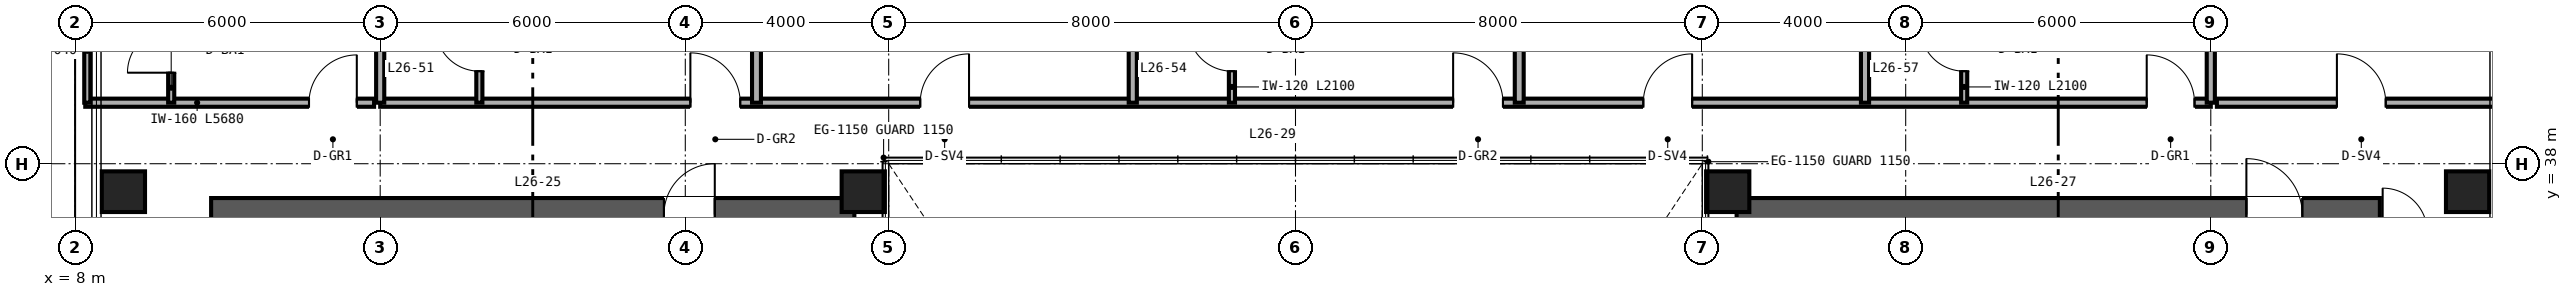
"""IFC4 building model, lengths in metres.
Left out: names, types, materials, properties, quantities, classifications, styles, units other than length and angle.
Written with IfcOpenShell. Run it as: python <this file> out.ifc"""

import sys

from ifc_helpers import new_model, si_unit, direction, frame, frame_2d, origin, origin_2d, place, context, subcontext, project, spatial, rectangle, hollow_rectangle, extrude, source, transform, mapped, element, fill, save


model = new_model("IFC4")
c1 = context("Model", 3, precision=1e-05, world=origin(), true_north=direction((0.0, 1.0)))
c2 = subcontext(c1, "Body", "Model", "MODEL_VIEW")
j1 = project(units=[si_unit("LENGTHUNIT", "METRE"), si_unit("PLANEANGLEUNIT", "RADIAN")], contexts=[c1])
p1 = place(None, origin())
s1 = spatial("IfcSite", under=j1, at=p1, CompositionType="ELEMENT")
p2 = place(p1, origin())
s2 = spatial("IfcBuilding", under=s1, at=p2, CompositionType="ELEMENT")
p3 = place(p2, frame((0.0, 0.0, 108.0)))
s3 = spatial("IfcBuildingStorey", under=s2, at=p3, CompositionType="ELEMENT", Elevation=108.0)
p4 = place(p3, frame((10.675, 37.0, 0.0), z_axis=(0.0, 0.0, 1.0), x_axis=(1.0, 0.0, 0.0)))
e1 = element("IfcWall", 1, at=p4, inside=s3, PredefinedType="SHEAR", context=c2, shape_type="SweptSolid", body=[
    extrude(rectangle(XDim=12.65, YDim=0.65, at=frame_2d((6.325, 0.0))), origin(), (0.0, 0.0, 1.0), 3.36),
])
p5 = place(p4, frame((8.905, 0.0, 0.0)))
e2 = element("IfcOpeningElement", 2, at=p5, cuts=e1, PredefinedType="OPENING", context=c2, shape_type="SweptSolid", body=[
    extrude(rectangle(XDim=1.0, YDim=2.15, at=frame_2d((0.5, 1.075))), frame((0.0, 0.335, 0.0), z_axis=(0.0, -1.0, 0.0), x_axis=(1.0, 0.0, 0.0)), (0.0, 0.0, 1.0), 0.67),
])
p6 = place(p3, frame((40.675, 37.0, 0.0), z_axis=(0.0, 0.0, 1.0), x_axis=(1.0, 0.0, 0.0)))
e3 = element("IfcWall", 3, at=p6, inside=s3, PredefinedType="SHEAR", context=c2, shape_type="SweptSolid", body=[
    extrude(rectangle(XDim=12.65, YDim=0.65, at=frame_2d((6.325, 0.0))), origin(), (0.0, 0.0, 1.0), 3.36),
])
p7 = place(p6, frame((10.025, 0.0, 0.0)))
e4 = element("IfcOpeningElement", 4, at=p7, cuts=e3, PredefinedType="OPENING", context=c2, shape_type="SweptSolid", body=[
    extrude(rectangle(XDim=1.1, YDim=2.15, at=frame_2d((0.55, 1.075))), frame((0.0, 0.335, 0.0), z_axis=(0.0, -1.0, 0.0), x_axis=(1.0, 0.0, 0.0)), (0.0, 0.0, 1.0), 0.67),
])
m1 = source(origin(), c2, "Body", "SweptSolid", [
    extrude(hollow_rectangle(XDim=0.85, YDim=0.8, WallThickness=0.032, at=origin_2d()), origin(), (0.0, 0.0, 1.0), 3.36),
])
for number, where, z_axis, x_axis in (
    (5, (8.95, 37.45, 0.0), (0.0, 0.0, 1.0), (1.0, 0.0, 0.0)),
    (6, (23.5, 37.45, 0.0), (0.0, 0.0, 1.0), (1.0, 0.0, 0.0)),
    (7, (40.5, 37.45, 0.0), (0.0, 0.0, 1.0), (1.0, 0.0, 0.0)),
    (8, (55.05, 37.45, 0.0), (0.0, 0.0, 1.0), (1.0, 0.0, 0.0)),
):
    element("IfcColumn", number, at=place(p3, frame(where, z_axis=z_axis, x_axis=x_axis)), inside=s3, PredefinedType="COLUMN", context=c2, shape_type="MappedRepresentation", body=[
        mapped(m1, transform((0.0, 0.0, 0.0), scale=1.0)),
    ])
p8 = place(p3, frame((8.2, 39.2, 0.0), z_axis=(0.0, 0.0, 1.0), x_axis=(1.0, 0.0, 0.0)))
e9 = element("IfcWall", 9, at=p8, inside=s3, PredefinedType="PARTITIONING", context=c2, shape_type="SweptSolid", body=[
    extrude(rectangle(XDim=5.68, YDim=0.16, at=frame_2d((2.84, 0.0))), origin(), (0.0, 0.0, 1.0), 3.36),
])
p9 = place(p8, frame((4.4, 0.0, 0.0)))
e10 = element("IfcOpeningElement", 10, at=p9, cuts=e9, PredefinedType="OPENING", context=c2, shape_type="SweptSolid", body=[
    extrude(rectangle(XDim=0.94, YDim=2.15, at=frame_2d((0.47, 1.075))), frame((0.0, 0.09, 0.0), z_axis=(0.0, -1.0, 0.0), x_axis=(1.0, 0.0, 0.0)), (0.0, 0.0, 1.0), 0.18),
])
p10 = place(p3, frame((9.89, 39.2, 0.0), z_axis=(0.0, 0.0, 1.0), x_axis=(0.0, 1.0, 0.0)))
e11 = element("IfcWall", 11, at=p10, inside=s3, PredefinedType="PARTITIONING", context=c2, shape_type="SweptSolid", body=[
    extrude(rectangle(XDim=2.04, YDim=0.12, at=frame_2d((1.02, 0.0))), origin(), (0.0, 0.0, 1.0), 3.36),
])
p11 = place(p10, frame((0.59, 0.0, 0.0)))
e12 = element("IfcOpeningElement", 12, at=p11, cuts=e11, PredefinedType="OPENING", context=c2, shape_type="SweptSolid", body=[
    extrude(rectangle(XDim=0.86, YDim=2.1, at=frame_2d((0.43, 1.05))), frame((0.0, 0.07, 0.0), z_axis=(0.0, -1.0, 0.0), x_axis=(1.0, 0.0, 0.0)), (0.0, 0.0, 1.0), 0.14),
])
p12 = place(p3, frame((8.24, 39.2, 0.0), z_axis=(0.0, 0.0, 1.0), x_axis=(0.0, 1.0, 0.0)))
e13 = element("IfcWall", 13, at=p12, inside=s3, PredefinedType="PARTITIONING", context=c2, shape_type="SweptSolid", body=[
    extrude(rectangle(XDim=2.04, YDim=0.12, at=frame_2d((1.02, 0.0))), origin(), (0.0, 0.0, 1.0), 3.36),
])
p13 = place(p3, frame((50.12, 39.2, 0.0), z_axis=(0.0, 0.0, 1.0), x_axis=(1.0, 0.0, 0.0)))
e14 = element("IfcWall", 14, at=p13, inside=s3, PredefinedType="PARTITIONING", context=c2, shape_type="SweptSolid", body=[
    extrude(rectangle(XDim=5.68, YDim=0.16, at=frame_2d((2.84, 0.0))), origin(), (0.0, 0.0, 1.0), 3.36),
])
p14 = place(p13, frame((2.36, 0.0, 0.0)))
e15 = element("IfcOpeningElement", 15, at=p14, cuts=e14, PredefinedType="OPENING", context=c2, shape_type="SweptSolid", body=[
    extrude(rectangle(XDim=0.96, YDim=2.15, at=frame_2d((0.48, 1.075))), frame((0.0, 0.09, 0.0), z_axis=(0.0, -1.0, 0.0), x_axis=(1.0, 0.0, 0.0)), (0.0, 0.0, 1.0), 0.18),
])
p15 = place(p3, frame((14.0, 39.2, 0.0), z_axis=(0.0, 0.0, 1.0), x_axis=(1.0, 0.0, 0.0)))
e16 = element("IfcWall", 16, at=p15, inside=s3, PredefinedType="PARTITIONING", context=c2, shape_type="SweptSolid", body=[
    extrude(rectangle(XDim=36.0, YDim=0.16, at=frame_2d((18.0, 0.0))), origin(), (0.0, 0.0, 1.0), 2.581),
])
p16 = place(p15, frame((6.1, 0.0, 0.0)))
e17 = element("IfcOpeningElement", 17, at=p16, cuts=e16, PredefinedType="OPENING", context=c2, shape_type="SweptSolid", body=[
    extrude(rectangle(XDim=0.98, YDim=2.2, at=frame_2d((0.49, 1.1))), frame((0.0, 0.09, 0.0), z_axis=(0.0, -1.0, 0.0), x_axis=(1.0, 0.0, 0.0)), (0.0, 0.0, 1.0), 0.18),
])
p17 = place(p15, frame((10.62, 0.0, 0.0)))
e18 = element("IfcOpeningElement", 18, at=p17, cuts=e16, PredefinedType="OPENING", context=c2, shape_type="SweptSolid", body=[
    extrude(rectangle(XDim=0.96, YDim=2.15, at=frame_2d((0.48, 1.075))), frame((0.0, 0.09, 0.0), z_axis=(0.0, -1.0, 0.0), x_axis=(1.0, 0.0, 0.0)), (0.0, 0.0, 1.0), 0.18),
])
p18 = place(p15, frame((21.1, 0.0, 0.0)))
e19 = element("IfcOpeningElement", 19, at=p18, cuts=e16, PredefinedType="OPENING", context=c2, shape_type="SweptSolid", body=[
    extrude(rectangle(XDim=0.98, YDim=2.2, at=frame_2d((0.49, 1.1))), frame((0.0, 0.09, 0.0), z_axis=(0.0, -1.0, 0.0), x_axis=(1.0, 0.0, 0.0)), (0.0, 0.0, 1.0), 0.18),
])
p19 = place(p15, frame((24.84, 0.0, 0.0)))
e20 = element("IfcOpeningElement", 20, at=p19, cuts=e16, PredefinedType="OPENING", context=c2, shape_type="SweptSolid", body=[
    extrude(rectangle(XDim=0.96, YDim=2.15, at=frame_2d((0.48, 1.075))), frame((0.0, 0.09, 0.0), z_axis=(0.0, -1.0, 0.0), x_axis=(1.0, 0.0, 0.0)), (0.0, 0.0, 1.0), 0.18),
])
p20 = place(p15, frame((34.74, 0.0, 0.0)))
e21 = element("IfcOpeningElement", 21, at=p20, cuts=e16, PredefinedType="OPENING", context=c2, shape_type="SweptSolid", body=[
    extrude(rectangle(XDim=0.94, YDim=2.15, at=frame_2d((0.47, 1.075))), frame((0.0, 0.09, 0.0), z_axis=(0.0, -1.0, 0.0), x_axis=(1.0, 0.0, 0.0)), (0.0, 0.0, 1.0), 0.18),
])
for number, where, z_axis, x_axis in (
    (22, (14.0, 39.2, 0.0), (0.0, 0.0, 1.0), (0.0, 1.0, 0.0)),
    (23, (50.0, 39.2, 0.0), (0.0, 0.0, 1.0), (0.0, 1.0, 0.0)),
):
    element("IfcWall", number, at=place(p3, frame(where, z_axis=z_axis, x_axis=x_axis)), inside=s3, PredefinedType="PARTITIONING", context=c2, shape_type="SweptSolid", body=[
        extrude(rectangle(XDim=10.44, YDim=0.16, at=frame_2d((5.22, 0.0))), origin(), (0.0, 0.0, 1.0), 2.667),
    ])
p21 = place(p3, frame((21.4, 39.2, 0.0), z_axis=(0.0, 0.0, 1.0), x_axis=(0.0, 1.0, 0.0)))
e24 = element("IfcWall", 24, at=p21, inside=s3, PredefinedType="PARTITIONING", context=c2, shape_type="SweptSolid", body=[
    extrude(rectangle(XDim=10.44, YDim=0.175, at=frame_2d((5.22, 0.0))), origin(), (0.0, 0.0, 1.0), 2.823),
])
p22 = place(p3, frame((15.95, 39.2, 0.0), z_axis=(0.0, 0.0, 1.0), x_axis=(0.0, 1.0, 0.0)))
e25 = element("IfcWall", 25, at=p22, inside=s3, PredefinedType="PARTITIONING", context=c2, shape_type="SweptSolid", body=[
    extrude(rectangle(XDim=2.1, YDim=0.12, at=frame_2d((1.05, 0.0))), origin(), (0.0, 0.0, 1.0), 3.36),
])
p23 = place(p22, frame((0.62, 0.0, 0.0)))
e26 = element("IfcOpeningElement", 26, at=p23, cuts=e25, PredefinedType="OPENING", context=c2, shape_type="SweptSolid", body=[
    extrude(rectangle(XDim=0.86, YDim=2.1, at=frame_2d((0.43, 1.05))), frame((0.0, 0.07, 0.0), z_axis=(0.0, -1.0, 0.0), x_axis=(1.0, 0.0, 0.0)), (0.0, 0.0, 1.0), 0.14),
])
p24 = place(p3, frame((28.8, 39.2, 0.0), z_axis=(0.0, 0.0, 1.0), x_axis=(0.0, 1.0, 0.0)))
e27 = element("IfcWall", 27, at=p24, inside=s3, PredefinedType="PARTITIONING", context=c2, shape_type="SweptSolid", body=[
    extrude(rectangle(XDim=10.44, YDim=0.16, at=frame_2d((5.22, 0.0))), origin(), (0.0, 0.0, 1.0), 2.433),
])
p25 = place(p3, frame((36.4, 39.2, 0.0), z_axis=(0.0, 0.0, 1.0), x_axis=(0.0, 1.0, 0.0)))
e28 = element("IfcWall", 28, at=p25, inside=s3, PredefinedType="PARTITIONING", context=c2, shape_type="SweptSolid", body=[
    extrude(rectangle(XDim=10.44, YDim=0.175, at=frame_2d((5.22, 0.0))), origin(), (0.0, 0.0, 1.0), 2.433),
])
p26 = place(p3, frame((30.75, 39.2, 0.0), z_axis=(0.0, 0.0, 1.0), x_axis=(0.0, 1.0, 0.0)))
e29 = element("IfcWall", 29, at=p26, inside=s3, PredefinedType="PARTITIONING", context=c2, shape_type="SweptSolid", body=[
    extrude(rectangle(XDim=2.1, YDim=0.12, at=frame_2d((1.05, 0.0))), origin(), (0.0, 0.0, 1.0), 3.36),
])
p27 = place(p26, frame((0.62, 0.0, 0.0)))
e30 = element("IfcOpeningElement", 30, at=p27, cuts=e29, PredefinedType="OPENING", context=c2, shape_type="SweptSolid", body=[
    extrude(rectangle(XDim=0.86, YDim=2.1, at=frame_2d((0.43, 1.05))), frame((0.0, 0.07, 0.0), z_axis=(0.0, -1.0, 0.0), x_axis=(1.0, 0.0, 0.0)), (0.0, 0.0, 1.0), 0.14),
])
p28 = place(p3, frame((43.2, 39.2, 0.0), z_axis=(0.0, 0.0, 1.0), x_axis=(0.0, 1.0, 0.0)))
e31 = element("IfcWall", 31, at=p28, inside=s3, PredefinedType="PARTITIONING", context=c2, shape_type="SweptSolid", body=[
    extrude(rectangle(XDim=10.44, YDim=0.16, at=frame_2d((5.22, 0.0))), origin(), (0.0, 0.0, 1.0), 2.823),
])
p29 = place(p3, frame((45.15, 39.2, 0.0), z_axis=(0.0, 0.0, 1.0), x_axis=(0.0, 1.0, 0.0)))
e32 = element("IfcWall", 32, at=p29, inside=s3, PredefinedType="PARTITIONING", context=c2, shape_type="SweptSolid", body=[
    extrude(rectangle(XDim=2.1, YDim=0.12, at=frame_2d((1.05, 0.0))), origin(), (0.0, 0.0, 1.0), 3.36),
])
p30 = place(p29, frame((0.62, 0.0, 0.0)))
e33 = element("IfcOpeningElement", 33, at=p30, cuts=e32, PredefinedType="OPENING", context=c2, shape_type="SweptSolid", body=[
    extrude(rectangle(XDim=0.86, YDim=2.1, at=frame_2d((0.43, 1.05))), frame((0.0, 0.07, 0.0), z_axis=(0.0, -1.0, 0.0), x_axis=(1.0, 0.0, 0.0)), (0.0, 0.0, 1.0), 0.14),
])
m2 = source(origin(), c2, "Body", "SweptSolid", [
    extrude(rectangle(XDim=1.0, YDim=2.15, at=frame_2d((0.5, 1.075))), frame((0.0, 0.025, 0.0), z_axis=(0.0, -1.0, 0.0), x_axis=(1.0, 0.0, 0.0)), (0.0, 0.0, 1.0), 0.05),
])
p31 = place(p5, origin())
e34 = element("IfcDoor", 34, at=p31, inside=s3, OperationType="SINGLE_SWING_RIGHT", PredefinedType="DOOR", context=c2, shape_type="MappedRepresentation", body=[
    mapped(m2, transform((0.0, 0.0, 0.0), scale=1.0)),
])
fill(e2, e34)
m3 = source(origin(), c2, "Body", "SweptSolid", [
    extrude(rectangle(XDim=1.1, YDim=2.15, at=frame_2d((0.55, 1.075))), frame((0.0, 0.025, 0.0), z_axis=(0.0, -1.0, 0.0), x_axis=(1.0, 0.0, 0.0)), (0.0, 0.0, 1.0), 0.05),
])
p32 = place(p7, origin())
e35 = element("IfcDoor", 35, at=p32, inside=s3, OperationType="SINGLE_SWING_LEFT", PredefinedType="DOOR", context=c2, shape_type="MappedRepresentation", body=[
    mapped(m3, transform((0.0, 0.0, 0.0), scale=1.0)),
])
fill(e4, e35)
m4 = source(origin(), c2, "Body", "SweptSolid", [
    extrude(rectangle(XDim=0.86, YDim=2.1, at=frame_2d((0.43, 1.05))), frame((0.0, 0.025, 0.0), z_axis=(0.0, -1.0, 0.0), x_axis=(1.0, 0.0, 0.0)), (0.0, 0.0, 1.0), 0.05),
])
p33 = place(p11, origin())
e36 = element("IfcDoor", 36, at=p33, inside=s3, OperationType="SINGLE_SWING_LEFT", PredefinedType="DOOR", context=c2, shape_type="MappedRepresentation", body=[
    mapped(m4, transform((0.0, 0.0, 0.0), scale=1.0)),
])
fill(e12, e36)
m5 = source(origin(), c2, "Body", "SweptSolid", [
    extrude(rectangle(XDim=0.94, YDim=2.15, at=frame_2d((0.47, 1.075))), frame((0.0, 0.025, 0.0), z_axis=(0.0, -1.0, 0.0), x_axis=(1.0, 0.0, 0.0)), (0.0, 0.0, 1.0), 0.05),
])
p34 = place(p9, origin())
e37 = element("IfcDoor", 37, at=p34, inside=s3, OperationType="SINGLE_SWING_RIGHT", PredefinedType="DOOR", context=c2, shape_type="MappedRepresentation", body=[
    mapped(m5, transform((0.0, 0.0, 0.0), scale=1.0)),
])
fill(e10, e37)
m6 = source(origin(), c2, "Body", "SweptSolid", [
    extrude(rectangle(XDim=0.96, YDim=2.15, at=frame_2d((0.48, 1.075))), frame((0.0, 0.025, 0.0), z_axis=(0.0, -1.0, 0.0), x_axis=(1.0, 0.0, 0.0)), (0.0, 0.0, 1.0), 0.05),
])
p35 = place(p14, origin())
e38 = element("IfcDoor", 38, at=p35, inside=s3, OperationType="SINGLE_SWING_LEFT", PredefinedType="DOOR", context=c2, shape_type="MappedRepresentation", body=[
    mapped(m6, transform((0.0, 0.0, 0.0), scale=1.0)),
])
fill(e15, e38)
p36 = place(p23, origin())
e39 = element("IfcDoor", 39, at=p36, inside=s3, OperationType="SINGLE_SWING_RIGHT", PredefinedType="DOOR", context=c2, shape_type="MappedRepresentation", body=[
    mapped(m4, transform((0.0, 0.0, 0.0), scale=1.0)),
])
fill(e26, e39)
p37 = place(p27, origin())
e40 = element("IfcDoor", 40, at=p37, inside=s3, OperationType="SINGLE_SWING_RIGHT", PredefinedType="DOOR", context=c2, shape_type="MappedRepresentation", body=[
    mapped(m4, transform((0.0, 0.0, 0.0), scale=1.0)),
])
fill(e30, e40)
p38 = place(p30, origin())
e41 = element("IfcDoor", 41, at=p38, inside=s3, OperationType="SINGLE_SWING_RIGHT", PredefinedType="DOOR", context=c2, shape_type="MappedRepresentation", body=[
    mapped(m4, transform((0.0, 0.0, 0.0), scale=1.0)),
])
fill(e33, e41)
m7 = source(origin(), c2, "Body", "SweptSolid", [
    extrude(rectangle(XDim=0.98, YDim=2.2, at=frame_2d((0.49, 1.1))), frame((0.0, 0.025, 0.0), z_axis=(0.0, -1.0, 0.0), x_axis=(1.0, 0.0, 0.0)), (0.0, 0.0, 1.0), 0.05),
])
p39 = place(p16, origin())
e42 = element("IfcDoor", 42, at=p39, inside=s3, OperationType="SINGLE_SWING_LEFT", PredefinedType="DOOR", context=c2, shape_type="MappedRepresentation", body=[
    mapped(m7, transform((0.0, 0.0, 0.0), scale=1.0)),
])
fill(e17, e42)
p40 = place(p17, origin())
e43 = element("IfcDoor", 43, at=p40, inside=s3, OperationType="SINGLE_SWING_RIGHT", PredefinedType="DOOR", context=c2, shape_type="MappedRepresentation", body=[
    mapped(m6, transform((0.0, 0.0, 0.0), scale=1.0)),
])
fill(e18, e43)
p41 = place(p18, origin())
e44 = element("IfcDoor", 44, at=p41, inside=s3, OperationType="SINGLE_SWING_LEFT", PredefinedType="DOOR", context=c2, shape_type="MappedRepresentation", body=[
    mapped(m7, transform((0.0, 0.0, 0.0), scale=1.0)),
])
fill(e19, e44)
p42 = place(p19, origin())
e45 = element("IfcDoor", 45, at=p42, inside=s3, OperationType="SINGLE_SWING_RIGHT", PredefinedType="DOOR", context=c2, shape_type="MappedRepresentation", body=[
    mapped(m6, transform((0.0, 0.0, 0.0), scale=1.0)),
])
fill(e20, e45)
p43 = place(p20, origin())
e46 = element("IfcDoor", 46, at=p43, inside=s3, OperationType="SINGLE_SWING_LEFT", PredefinedType="DOOR", context=c2, shape_type="MappedRepresentation", body=[
    mapped(m5, transform((0.0, 0.0, 0.0), scale=1.0)),
])
fill(e21, e46)
save(model, sys.argv[1])
